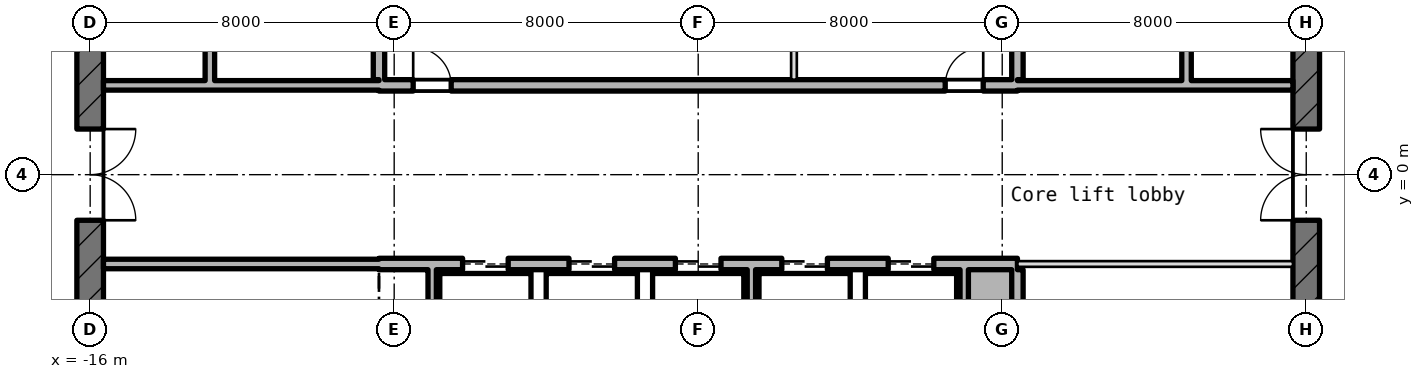
"""IFC4 building model, lengths in metres.
Left out: names, types, materials, properties, quantities, classifications, styles, units other than length and angle.
Written with IfcOpenShell. Run it as: python <this file> out.ifc"""

import sys

from ifc_helpers import new_model, si_unit, direction, frame, frame_2d, origin, place, context, subcontext, project, spatial, rectangle, extrude, element, fill, save


model = new_model("IFC4")
c1 = context("Model", 3, precision=1e-05, world=origin(), true_north=direction((0.0, 1.0)))
c2 = subcontext(c1, "Body", "Model", "MODEL_VIEW")
j1 = project(units=[si_unit("LENGTHUNIT", "METRE"), si_unit("PLANEANGLEUNIT", "RADIAN")], contexts=[c1])
p1 = place(None, origin())
s1 = spatial("IfcSite", under=j1, at=p1, CompositionType="ELEMENT")
p2 = place(p1, origin())
s2 = spatial("IfcBuilding", under=s1, at=p2, CompositionType="ELEMENT")
p3 = place(p2, frame((0.0, 0.0, 284.5)))
s3 = spatial("IfcBuildingStorey", under=s2, at=p3, CompositionType="ELEMENT", Elevation=284.5)
p4 = place(p3, frame((16.0, -10.145, -0.18), z_axis=(0.0, 0.0, 1.0), x_axis=(0.0, 1.0, 0.0)))
e1 = element("IfcWall", 1, at=p4, inside=s3, PredefinedType="SHEAR", context=c2, shape_type="SweptSolid", body=[
    extrude(rectangle(XDim=20.29, YDim=0.7, at=frame_2d((10.145, 0.0))), origin(), (0.0, 0.0, 1.0), 4.15),
])
p5 = place(p4, frame((8.945, 0.0, 0.18)))
e2 = element("IfcOpeningElement", 2, at=p5, cuts=e1, PredefinedType="OPENING", context=c2, shape_type="SweptSolid", body=[
    extrude(rectangle(XDim=2.4, YDim=2.1, at=frame_2d((1.2, 1.05))), frame((0.0, 0.36, 0.0), z_axis=(0.0, -1.0, 0.0), x_axis=(1.0, 0.0, 0.0)), (0.0, 0.0, 1.0), 0.72),
])
p6 = place(p4, frame((13.545, 0.0, 0.18)))
e3 = element("IfcOpeningElement", 3, at=p6, cuts=e1, PredefinedType="OPENING", context=c2, shape_type="SweptSolid", body=[
    extrude(rectangle(XDim=1.2, YDim=2.1, at=frame_2d((0.6, 1.05))), frame((0.0, 0.36, 0.0), z_axis=(0.0, -1.0, 0.0), x_axis=(1.0, 0.0, 0.0)), (0.0, 0.0, 1.0), 0.72),
])
p7 = place(p4, frame((3.545, 0.0, 0.18)))
e4 = element("IfcOpeningElement", 4, at=p7, cuts=e1, PredefinedType="OPENING", context=c2, shape_type="SweptSolid", body=[
    extrude(rectangle(XDim=1.2, YDim=2.1, at=frame_2d((0.6, 1.05))), frame((0.0, 0.36, 0.0), z_axis=(0.0, -1.0, 0.0), x_axis=(1.0, 0.0, 0.0)), (0.0, 0.0, 1.0), 0.72),
])
p8 = place(p3, frame((-16.0, 10.145, -0.18), z_axis=(0.0, 0.0, 1.0), x_axis=(0.0, -1.0, 0.0)))
e5 = element("IfcWall", 5, at=p8, inside=s3, PredefinedType="SHEAR", context=c2, shape_type="SweptSolid", body=[
    extrude(rectangle(XDim=20.29, YDim=0.7, at=frame_2d((10.145, 0.0))), origin(), (0.0, 0.0, 1.0), 4.15),
])
p9 = place(p8, frame((8.945, 0.0, 0.18)))
e6 = element("IfcOpeningElement", 6, at=p9, cuts=e5, PredefinedType="OPENING", context=c2, shape_type="SweptSolid", body=[
    extrude(rectangle(XDim=2.4, YDim=2.1, at=frame_2d((1.2, 1.05))), frame((0.0, 0.36, 0.0), z_axis=(0.0, -1.0, 0.0), x_axis=(1.0, 0.0, 0.0)), (0.0, 0.0, 1.0), 0.72),
])
p10 = place(p8, frame((5.545, 0.0, 0.18)))
e7 = element("IfcOpeningElement", 7, at=p10, cuts=e5, PredefinedType="OPENING", context=c2, shape_type="SweptSolid", body=[
    extrude(rectangle(XDim=1.2, YDim=2.1, at=frame_2d((0.6, 1.05))), frame((0.0, 0.36, 0.0), z_axis=(0.0, -1.0, 0.0), x_axis=(1.0, 0.0, 0.0)), (0.0, 0.0, 1.0), 0.72),
])
p11 = place(p3, frame((-15.65, -2.35, 0.0), z_axis=(0.0, 0.0, 1.0), x_axis=(1.0, 0.0, 0.0)))
e8 = element("IfcWall", 8, at=p11, inside=s3, PredefinedType="STANDARD", context=c2, shape_type="SweptSolid", body=[
    extrude(rectangle(XDim=7.25, YDim=0.25, at=frame_2d((3.625, 0.0))), origin(), (0.0, 0.0, 1.0), 3.97),
])
p12 = place(p3, frame((-8.4, -2.35, -0.18), z_axis=(0.0, 0.0, 1.0), x_axis=(1.0, 0.0, 0.0)))
e9 = element("IfcWall", 9, at=p12, inside=s3, PredefinedType="SHEAR", context=c2, shape_type="SweptSolid", body=[
    extrude(rectangle(XDim=16.8, YDim=0.3, at=frame_2d((8.4, 0.0))), origin(), (0.0, 0.0, 1.0), 4.15),
])
p13 = place(p12, frame((2.2, 0.0, 0.18)))
e10 = element("IfcOpeningElement", 10, at=p13, cuts=e9, PredefinedType="OPENING", context=c2, shape_type="SweptSolid", body=[
    extrude(rectangle(XDim=1.2, YDim=2.1, at=frame_2d((0.6, 1.05))), frame((0.0, 0.16, 0.0), z_axis=(0.0, -1.0, 0.0), x_axis=(1.0, 0.0, 0.0)), (0.0, 0.0, 1.0), 0.32),
])
p14 = place(p12, frame((5.0, 0.0, 0.18)))
e11 = element("IfcOpeningElement", 11, at=p14, cuts=e9, PredefinedType="OPENING", context=c2, shape_type="SweptSolid", body=[
    extrude(rectangle(XDim=1.2, YDim=2.1, at=frame_2d((0.6, 1.05))), frame((0.0, 0.16, 0.0), z_axis=(0.0, -1.0, 0.0), x_axis=(1.0, 0.0, 0.0)), (0.0, 0.0, 1.0), 0.32),
])
p15 = place(p12, frame((7.8, 0.0, 0.18)))
e12 = element("IfcOpeningElement", 12, at=p15, cuts=e9, PredefinedType="OPENING", context=c2, shape_type="SweptSolid", body=[
    extrude(rectangle(XDim=1.2, YDim=2.1, at=frame_2d((0.6, 1.05))), frame((0.0, 0.16, 0.0), z_axis=(0.0, -1.0, 0.0), x_axis=(1.0, 0.0, 0.0)), (0.0, 0.0, 1.0), 0.32),
])
p16 = place(p12, frame((10.6, 0.0, 0.18)))
e13 = element("IfcOpeningElement", 13, at=p16, cuts=e9, PredefinedType="OPENING", context=c2, shape_type="SweptSolid", body=[
    extrude(rectangle(XDim=1.2, YDim=2.1, at=frame_2d((0.6, 1.05))), frame((0.0, 0.16, 0.0), z_axis=(0.0, -1.0, 0.0), x_axis=(1.0, 0.0, 0.0)), (0.0, 0.0, 1.0), 0.32),
])
p17 = place(p12, frame((13.4, 0.0, 0.18)))
e14 = element("IfcOpeningElement", 14, at=p17, cuts=e9, PredefinedType="OPENING", context=c2, shape_type="SweptSolid", body=[
    extrude(rectangle(XDim=1.2, YDim=2.1, at=frame_2d((0.6, 1.05))), frame((0.0, 0.16, 0.0), z_axis=(0.0, -1.0, 0.0), x_axis=(1.0, 0.0, 0.0)), (0.0, 0.0, 1.0), 0.32),
])
p18 = place(p3, frame((8.4, -2.35, 0.0), z_axis=(0.0, 0.0, 1.0), x_axis=(1.0, 0.0, 0.0)))
e15 = element("IfcWall", 15, at=p18, inside=s3, PredefinedType="PARTITIONING", context=c2, shape_type="SweptSolid", body=[
    extrude(rectangle(XDim=7.25, YDim=0.15, at=frame_2d((3.625, 0.0))), origin(), (0.0, 0.0, 1.0), 3.97),
])
p19 = place(p3, frame((-15.65, 2.35, 0.0), z_axis=(0.0, 0.0, 1.0), x_axis=(1.0, 0.0, 0.0)))
e16 = element("IfcWall", 16, at=p19, inside=s3, PredefinedType="STANDARD", context=c2, shape_type="SweptSolid", body=[
    extrude(rectangle(XDim=7.25, YDim=0.25, at=frame_2d((3.625, 0.0))), origin(), (0.0, 0.0, 1.0), 3.97),
])
p20 = place(p3, frame((-8.4, 2.35, -0.18), z_axis=(0.0, 0.0, 1.0), x_axis=(1.0, 0.0, 0.0)))
e17 = element("IfcWall", 17, at=p20, inside=s3, PredefinedType="SHEAR", context=c2, shape_type="SweptSolid", body=[
    extrude(rectangle(XDim=16.8, YDim=0.3, at=frame_2d((8.4, 0.0))), origin(), (0.0, 0.0, 1.0), 4.15),
])
p21 = place(p20, frame((0.9, 0.0, 0.18)))
e18 = element("IfcOpeningElement", 18, at=p21, cuts=e17, PredefinedType="OPENING", context=c2, shape_type="SweptSolid", body=[
    extrude(rectangle(XDim=1.0, YDim=2.1, at=frame_2d((0.5, 1.05))), frame((0.0, 0.16, 0.0), z_axis=(0.0, -1.0, 0.0), x_axis=(1.0, 0.0, 0.0)), (0.0, 0.0, 1.0), 0.32),
])
p22 = place(p20, frame((14.9, 0.0, 0.18)))
e19 = element("IfcOpeningElement", 19, at=p22, cuts=e17, PredefinedType="OPENING", context=c2, shape_type="SweptSolid", body=[
    extrude(rectangle(XDim=1.0, YDim=2.1, at=frame_2d((0.5, 1.05))), frame((0.0, 0.16, 0.0), z_axis=(0.0, -1.0, 0.0), x_axis=(1.0, 0.0, 0.0)), (0.0, 0.0, 1.0), 0.32),
])
p23 = place(p3, frame((8.4, 2.35, 0.0), z_axis=(0.0, 0.0, 1.0), x_axis=(1.0, 0.0, 0.0)))
e20 = element("IfcWall", 20, at=p23, inside=s3, PredefinedType="STANDARD", context=c2, shape_type="SweptSolid", body=[
    extrude(rectangle(XDim=7.25, YDim=0.25, at=frame_2d((3.625, 0.0))), origin(), (0.0, 0.0, 1.0), 3.97),
])
p24 = place(p3, frame((-12.85, 2.475, 0.0), z_axis=(0.0, 0.0, 1.0), x_axis=(0.0, 1.0, 0.0)))
e21 = element("IfcWall", 21, at=p24, inside=s3, PredefinedType="STANDARD", context=c2, shape_type="SweptSolid", body=[
    extrude(rectangle(XDim=3.05, YDim=0.25, at=frame_2d((1.525, 0.0))), origin(), (0.0, 0.0, 1.0), 3.97),
])
p25 = place(p3, frame((-8.4, 2.5, -0.18), z_axis=(0.0, 0.0, 1.0), x_axis=(0.0, 1.0, 0.0)))
e22 = element("IfcWall", 22, at=p25, inside=s3, PredefinedType="SHEAR", context=c2, shape_type="SweptSolid", body=[
    extrude(rectangle(XDim=5.85, YDim=0.3, at=frame_2d((2.925, 0.0))), origin(), (0.0, 0.0, 1.0), 4.15),
])
for number, where, z_axis, x_axis in (
    (23, (-7.0, -5.24, 0.0), (0.0, 0.0, 1.0), (0.0, 1.0, 0.0)),
    (24, (1.4, -5.24, 0.0), (0.0, 0.0, 1.0), (0.0, 1.0, 0.0)),
):
    element("IfcWall", number, at=place(p3, frame(where, z_axis=z_axis, x_axis=x_axis)), inside=s3, PredefinedType="STANDARD", context=c2, shape_type="SweptSolid", body=[
        extrude(rectangle(XDim=2.74, YDim=0.22, at=frame_2d((1.37, 0.0))), origin(), (0.0, 0.0, 1.0), 3.97),
    ])
p26 = place(p3, frame((2.52, 2.5, 0.0), z_axis=(0.0, 0.0, 1.0), x_axis=(0.0, 1.0, 0.0)))
e25 = element("IfcWall", 25, at=p26, inside=s3, PredefinedType="PARTITIONING", context=c2, shape_type="SweptSolid", body=[
    extrude(rectangle(XDim=2.74, YDim=0.15, at=frame_2d((1.37, 0.0))), origin(), (0.0, 0.0, 1.0), 3.97),
])
p27 = place(p3, frame((7.0, -5.24, 0.0), z_axis=(0.0, 0.0, 1.0), x_axis=(0.0, 1.0, 0.0)))
e26 = element("IfcWall", 26, at=p27, inside=s3, PredefinedType="STANDARD", context=c2, shape_type="SweptSolid", body=[
    extrude(rectangle(XDim=2.74, YDim=0.22, at=frame_2d((1.37, 0.0))), origin(), (0.0, 0.0, 1.0), 3.97),
])
for number, where, z_axis, x_axis in (
    (27, (8.4, -8.35, -0.18), (0.0, 0.0, 1.0), (0.0, 1.0, 0.0)),
    (28, (8.4, 2.5, -0.18), (0.0, 0.0, 1.0), (0.0, 1.0, 0.0)),
):
    element("IfcWall", number, at=place(p3, frame(where, z_axis=z_axis, x_axis=x_axis)), inside=s3, PredefinedType="SHEAR", context=c2, shape_type="SweptSolid", body=[
        extrude(rectangle(XDim=5.85, YDim=0.3, at=frame_2d((2.925, 0.0))), origin(), (0.0, 0.0, 1.0), 4.15),
    ])
p28 = place(p3, frame((12.85, 2.475, 0.0), z_axis=(0.0, 0.0, 1.0), x_axis=(0.0, 1.0, 0.0)))
e29 = element("IfcWall", 29, at=p28, inside=s3, PredefinedType="STANDARD", context=c2, shape_type="SweptSolid", body=[
    extrude(rectangle(XDim=3.05, YDim=0.25, at=frame_2d((1.525, 0.0))), origin(), (0.0, 0.0, 1.0), 3.97),
])
p29 = place(p13, origin())
e30 = element("IfcDoor", 30, at=p29, inside=s3, OperationType="DOUBLE_DOOR_SLIDING", PredefinedType="DOOR", context=c2, shape_type="SweptSolid", body=[
    extrude(rectangle(XDim=1.2, YDim=2.1, at=frame_2d((0.6, 1.05))), frame((0.0, 0.025, 0.0), z_axis=(0.0, -1.0, 0.0), x_axis=(1.0, 0.0, 0.0)), (0.0, 0.0, 1.0), 0.05),
])
fill(e10, e30)
p30 = place(p14, origin())
e31 = element("IfcDoor", 31, at=p30, inside=s3, OperationType="DOUBLE_DOOR_SLIDING", PredefinedType="DOOR", context=c2, shape_type="SweptSolid", body=[
    extrude(rectangle(XDim=1.2, YDim=2.1, at=frame_2d((0.6, 1.05))), frame((0.0, 0.025, 0.0), z_axis=(0.0, -1.0, 0.0), x_axis=(1.0, 0.0, 0.0)), (0.0, 0.0, 1.0), 0.05),
])
fill(e11, e31)
p31 = place(p15, origin())
e32 = element("IfcDoor", 32, at=p31, inside=s3, OperationType="DOUBLE_DOOR_SLIDING", PredefinedType="DOOR", context=c2, shape_type="SweptSolid", body=[
    extrude(rectangle(XDim=1.2, YDim=2.1, at=frame_2d((0.6, 1.05))), frame((0.0, 0.025, 0.0), z_axis=(0.0, -1.0, 0.0), x_axis=(1.0, 0.0, 0.0)), (0.0, 0.0, 1.0), 0.05),
])
fill(e12, e32)
p32 = place(p16, origin())
e33 = element("IfcDoor", 33, at=p32, inside=s3, OperationType="DOUBLE_DOOR_SLIDING", PredefinedType="DOOR", context=c2, shape_type="SweptSolid", body=[
    extrude(rectangle(XDim=1.2, YDim=2.1, at=frame_2d((0.6, 1.05))), frame((0.0, 0.025, 0.0), z_axis=(0.0, -1.0, 0.0), x_axis=(1.0, 0.0, 0.0)), (0.0, 0.0, 1.0), 0.05),
])
fill(e13, e33)
p33 = place(p17, origin())
e34 = element("IfcDoor", 34, at=p33, inside=s3, OperationType="DOUBLE_DOOR_SLIDING", PredefinedType="DOOR", context=c2, shape_type="SweptSolid", body=[
    extrude(rectangle(XDim=1.2, YDim=2.1, at=frame_2d((0.6, 1.05))), frame((0.0, 0.025, 0.0), z_axis=(0.0, -1.0, 0.0), x_axis=(1.0, 0.0, 0.0)), (0.0, 0.0, 1.0), 0.05),
])
fill(e14, e34)
p34 = place(p9, origin())
e35 = element("IfcDoor", 35, at=p34, inside=s3, OperationType="DOUBLE_DOOR_SINGLE_SWING", PredefinedType="DOOR", context=c2, shape_type="SweptSolid", body=[
    extrude(rectangle(XDim=2.4, YDim=2.1, at=frame_2d((1.2, 1.05))), frame((0.0, 0.025, 0.0), z_axis=(0.0, -1.0, 0.0), x_axis=(1.0, 0.0, 0.0)), (0.0, 0.0, 1.0), 0.05),
])
fill(e6, e35)
p35 = place(p5, origin())
e36 = element("IfcDoor", 36, at=p35, inside=s3, OperationType="DOUBLE_DOOR_SINGLE_SWING", PredefinedType="DOOR", context=c2, shape_type="SweptSolid", body=[
    extrude(rectangle(XDim=2.4, YDim=2.1, at=frame_2d((1.2, 1.05))), frame((0.0, 0.025, 0.0), z_axis=(0.0, -1.0, 0.0), x_axis=(1.0, 0.0, 0.0)), (0.0, 0.0, 1.0), 0.05),
])
fill(e2, e36)
p36 = place(p21, origin())
e37 = element("IfcDoor", 37, at=p36, inside=s3, OperationType="SINGLE_SWING_RIGHT", PredefinedType="DOOR", context=c2, shape_type="SweptSolid", body=[
    extrude(rectangle(XDim=1.0, YDim=2.1, at=frame_2d((0.5, 1.05))), frame((0.0, 0.025, 0.0), z_axis=(0.0, -1.0, 0.0), x_axis=(1.0, 0.0, 0.0)), (0.0, 0.0, 1.0), 0.05),
])
fill(e18, e37)
p37 = place(p22, origin())
e38 = element("IfcDoor", 38, at=p37, inside=s3, OperationType="SINGLE_SWING_RIGHT", PredefinedType="DOOR", context=c2, shape_type="SweptSolid", body=[
    extrude(rectangle(XDim=1.0, YDim=2.1, at=frame_2d((0.5, 1.05))), frame((0.0, 0.025, 0.0), z_axis=(0.0, -1.0, 0.0), x_axis=(1.0, 0.0, 0.0)), (0.0, 0.0, 1.0), 0.05),
])
fill(e19, e38)
save(model, sys.argv[1])
